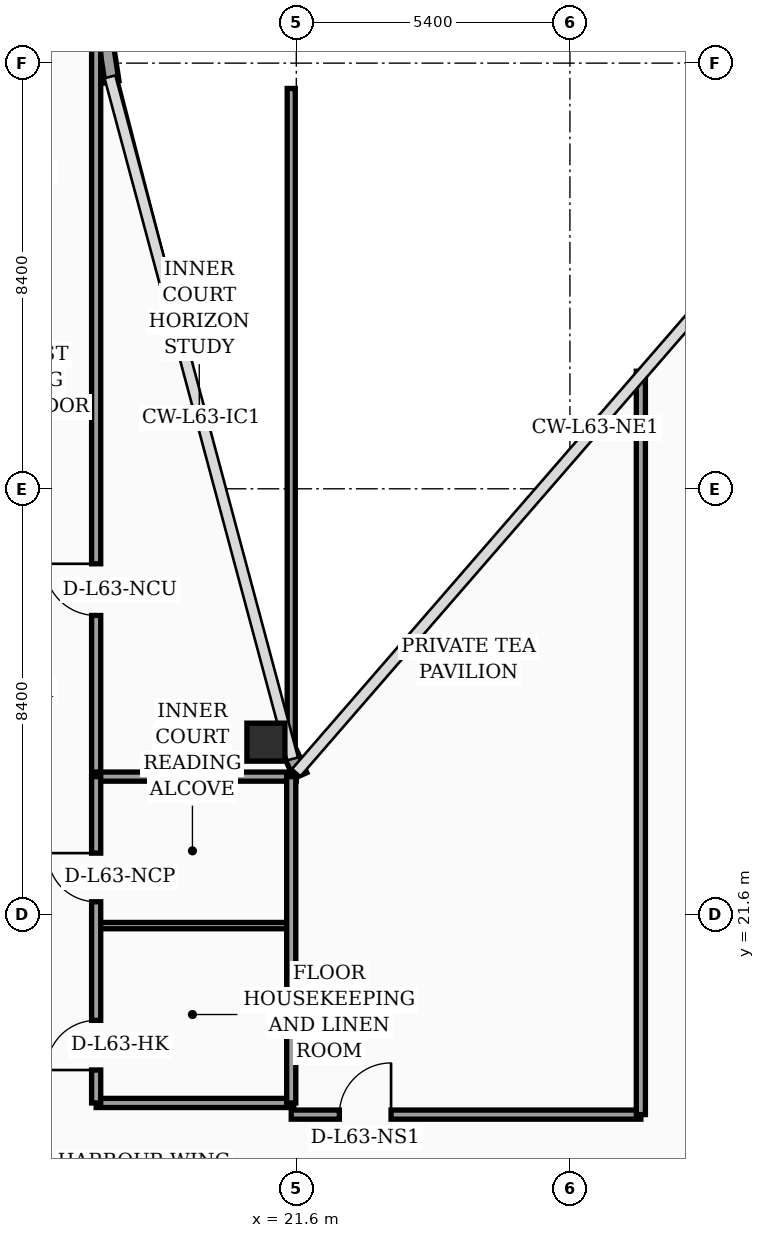
"""IFC4 building model, lengths in metres.
Left out: names, types, materials, properties, quantities, classifications, styles, units other than length and angle.
Written with IfcOpenShell. Run it as: python <this file> out.ifc"""

import sys

from ifc_helpers import new_model, si_unit, direction, frame, frame_2d, origin, origin_2d, place, context, subcontext, project, spatial, rectangle, hollow_rectangle, extrude, element, fill, save


model = new_model("IFC4")
c1 = context("Model", 3, precision=1e-05, world=origin(), true_north=direction((0.0, 1.0)))
c2 = subcontext(c1, "Body", "Model", "MODEL_VIEW")
j1 = project(units=[si_unit("LENGTHUNIT", "METRE"), si_unit("PLANEANGLEUNIT", "RADIAN")], contexts=[c1])
p1 = place(None, origin())
s1 = spatial("IfcSite", under=j1, at=p1, CompositionType="ELEMENT")
p2 = place(p1, origin())
s2 = spatial("IfcBuilding", under=s1, at=p2, CompositionType="ELEMENT")
p3 = place(p2, frame((0.0, 0.0, 255.2)))
s3 = spatial("IfcBuildingStorey", under=s2, at=p3, CompositionType="ELEMENT", Elevation=255.2)
p4 = place(p3, frame((21.0, 25.0, 0.0), z_axis=(0.0, 0.0, 1.0), x_axis=(1.0, 0.0, 0.0)))
e1 = element("IfcColumn", 1, at=p4, inside=s3, PredefinedType="COLUMN", context=c2, shape_type="SweptSolid", body=[
    extrude(hollow_rectangle(XDim=0.75, YDim=0.75, WallThickness=0.032, at=origin_2d()), origin(), (0.0, 0.0, 1.0), 3.56),
])
p5 = place(p3, frame((21.68, 24.34, 0.0), z_axis=(0.0, 0.0, 1.0), x_axis=(-0.40758134973, 0.913168901875, 0.0)))
e2 = element("IfcWall", 2, at=p5, inside=s3, PredefinedType="SOLIDWALL", context=c2, shape_type="SweptSolid", body=[
    extrude(rectangle(XDim=0.471, YDim=0.28, at=frame_2d((0.235, 0.0))), origin(), (0.0, 0.0, 1.0), 3.56),
])
p6 = place(p3, frame((17.962, 38.03, 0.0), z_axis=(0.0, 0.0, 1.0), x_axis=(-0.15141125477, 0.988470855377, 0.0)))
e3 = element("IfcWall", 3, at=p6, inside=s3, PredefinedType="SOLIDWALL", context=c2, shape_type="SweptSolid", body=[
    extrude(rectangle(XDim=0.739, YDim=0.28, at=frame_2d((0.369, 0.0))), origin(), (0.0, 0.0, 1.0), 3.56),
])
p7 = place(p3, frame((17.65, 24.3, 0.0), z_axis=(0.0, 0.0, 1.0), x_axis=(0.0, 1.0, 0.0)))
e4 = element("IfcWall", 4, at=p7, inside=s3, PredefinedType="PARTITIONING", context=c2, shape_type="SweptSolid", body=[
    extrude(rectangle(XDim=18.15, YDim=0.18, at=frame_2d((9.075, 0.0))), origin(), (0.0, 0.0, 1.0), 2.99),
])
p8 = place(p7, frame((3.2, 0.0, 0.0)))
e5 = element("IfcOpeningElement", 5, at=p8, cuts=e4, PredefinedType="OPENING", context=c2, shape_type="SweptSolid", body=[
    extrude(rectangle(XDim=1.02, YDim=2.2, at=frame_2d((0.51, 1.1))), frame((0.0, 0.1, 0.0), z_axis=(0.0, -1.0, 0.0), x_axis=(1.0, 0.0, 0.0)), (0.0, 0.0, 1.0), 0.2),
])
p9 = place(p3, frame((17.65, 17.88, 0.0), z_axis=(0.0, 0.0, 1.0), x_axis=(1.0, 0.0, 0.0)))
e6 = element("IfcWall", 6, at=p9, inside=s3, PredefinedType="PARTITIONING", context=c2, shape_type="SweptSolid", body=[
    extrude(rectangle(XDim=3.9, YDim=0.18, at=frame_2d((1.95, 0.0))), origin(), (0.0, 0.0, 1.0), 3.56),
])
p10 = place(p3, frame((17.65, 21.38, 0.0), z_axis=(0.0, 0.0, 1.0), x_axis=(1.0, 0.0, 0.0)))
e7 = element("IfcWall", 7, at=p10, inside=s3, PredefinedType="PARTITIONING", context=c2, shape_type="SweptSolid", body=[
    extrude(rectangle(XDim=3.9, YDim=0.125, at=frame_2d((1.95, 0.0))), origin(), (0.0, 0.0, 1.0), 3.09),
])
p11 = place(p3, frame((17.65, 24.32, 0.0), z_axis=(0.0, 0.0, 1.0), x_axis=(1.0, 0.0, 0.0)))
e8 = element("IfcWall", 8, at=p11, inside=s3, PredefinedType="PARTITIONING", context=c2, shape_type="SweptSolid", body=[
    extrude(rectangle(XDim=3.95, YDim=0.18, at=frame_2d((1.975, 0.0))), origin(), (0.0, 0.0, 1.0), 3.56),
])
p12 = place(p3, frame((21.5, 17.88, 0.0), z_axis=(0.0, 0.0, 1.0), x_axis=(0.0, 1.0, 0.0)))
e9 = element("IfcWall", 9, at=p12, inside=s3, PredefinedType="PARTITIONING", context=c2, shape_type="SweptSolid", body=[
    extrude(rectangle(XDim=6.44, YDim=0.18, at=frame_2d((3.22, 0.0))), origin(), (0.0, 0.0, 1.0), 3.09),
])
p13 = place(p3, frame((17.65, 17.88, 0.0), z_axis=(0.0, 0.0, 1.0), x_axis=(0.0, 1.0, 0.0)))
e10 = element("IfcWall", 10, at=p13, inside=s3, PredefinedType="PARTITIONING", context=c2, shape_type="SweptSolid", body=[
    extrude(rectangle(XDim=6.44, YDim=0.18, at=frame_2d((3.22, 0.0))), origin(), (0.0, 0.0, 1.0), 3.09),
])
p14 = place(p13, frame((0.65, 0.0, 0.0)))
e11 = element("IfcOpeningElement", 11, at=p14, cuts=e10, PredefinedType="OPENING", context=c2, shape_type="SweptSolid", body=[
    extrude(rectangle(XDim=0.98, YDim=2.15, at=frame_2d((0.49, 1.075))), frame((0.0, 0.1, 0.0), z_axis=(0.0, -1.0, 0.0), x_axis=(1.0, 0.0, 0.0)), (0.0, 0.0, 1.0), 0.2),
])
p15 = place(p13, frame((3.97, 0.0, 0.0)))
e12 = element("IfcOpeningElement", 12, at=p15, cuts=e10, PredefinedType="OPENING", context=c2, shape_type="SweptSolid", body=[
    extrude(rectangle(XDim=0.96, YDim=2.2, at=frame_2d((0.48, 1.1))), frame((0.0, 0.1, 0.0), z_axis=(0.0, -1.0, 0.0), x_axis=(1.0, 0.0, 0.0)), (0.0, 0.0, 1.0), 0.2),
])
p16 = place(p3, frame((21.5, 24.85, 0.0), z_axis=(0.0, 0.0, 1.0), x_axis=(0.0, 1.0, 0.0)))
e13 = element("IfcWall", 13, at=p16, inside=s3, PredefinedType="PARTITIONING", context=c2, shape_type="SweptSolid", body=[
    extrude(rectangle(XDim=13.05, YDim=0.16, at=frame_2d((6.525, 0.0))), origin(), (0.0, 0.0, 1.0), 2.99),
])
p17 = place(p3, frame((21.5, 17.65, 0.0), z_axis=(0.0, 0.0, 1.0), x_axis=(1.0, 0.0, 0.0)))
e14 = element("IfcWall", 14, at=p17, inside=s3, PredefinedType="PARTITIONING", context=c2, shape_type="SweptSolid", body=[
    extrude(rectangle(XDim=6.9, YDim=0.18, at=frame_2d((3.45, 0.0))), origin(), (0.0, 0.0, 1.0), 2.99),
])
p18 = place(p17, frame((0.95, 0.0, 0.0)))
e15 = element("IfcOpeningElement", 15, at=p18, cuts=e14, PredefinedType="OPENING", context=c2, shape_type="SweptSolid", body=[
    extrude(rectangle(XDim=1.02, YDim=2.2, at=frame_2d((0.51, 1.1))), frame((0.0, 0.1, 0.0), z_axis=(0.0, -1.0, 0.0), x_axis=(1.0, 0.0, 0.0)), (0.0, 0.0, 1.0), 0.2),
])
p19 = place(p3, frame((28.4, 17.65, 0.0), z_axis=(0.0, 0.0, 1.0), x_axis=(0.0, 1.0, 0.0)))
e16 = element("IfcWall", 16, at=p19, inside=s3, PredefinedType="PARTITIONING", context=c2, shape_type="SweptSolid", body=[
    extrude(rectangle(XDim=14.67, YDim=0.18, at=frame_2d((7.335, 0.0))), origin(), (0.0, 0.0, 1.0), 2.99),
])
p20 = place(p8, origin())
e17 = element("IfcDoor", 17, at=p20, inside=s3, OperationType="SINGLE_SWING_RIGHT", PredefinedType="DOOR", context=c2, shape_type="SweptSolid", body=[
    extrude(rectangle(XDim=1.02, YDim=2.2, at=frame_2d((0.51, 1.1))), frame((0.0, 0.025, 0.0), z_axis=(0.0, -1.0, 0.0), x_axis=(1.0, 0.0, 0.0)), (0.0, 0.0, 1.0), 0.05),
])
fill(e5, e17)
p21 = place(p14, origin())
e18 = element("IfcDoor", 18, at=p21, inside=s3, OperationType="SINGLE_SWING_LEFT", PredefinedType="DOOR", context=c2, shape_type="SweptSolid", body=[
    extrude(rectangle(XDim=0.98, YDim=2.15, at=frame_2d((0.49, 1.075))), frame((0.0, 0.025, 0.0), z_axis=(0.0, -1.0, 0.0), x_axis=(1.0, 0.0, 0.0)), (0.0, 0.0, 1.0), 0.05),
])
fill(e11, e18)
p22 = place(p15, origin())
e19 = element("IfcDoor", 19, at=p22, inside=s3, OperationType="SINGLE_SWING_RIGHT", PredefinedType="DOOR", context=c2, shape_type="SweptSolid", body=[
    extrude(rectangle(XDim=0.96, YDim=2.2, at=frame_2d((0.48, 1.1))), frame((0.0, 0.025, 0.0), z_axis=(0.0, -1.0, 0.0), x_axis=(1.0, 0.0, 0.0)), (0.0, 0.0, 1.0), 0.05),
])
fill(e12, e19)
p23 = place(p18, origin())
e20 = element("IfcDoor", 20, at=p23, inside=s3, OperationType="SINGLE_SWING_RIGHT", PredefinedType="DOOR", context=c2, shape_type="SweptSolid", body=[
    extrude(rectangle(XDim=1.02, YDim=2.2, at=frame_2d((0.51, 1.1))), frame((0.0, 0.025, 0.0), z_axis=(0.0, -1.0, 0.0), x_axis=(1.0, 0.0, 0.0)), (0.0, 0.0, 1.0), 0.05),
])
fill(e15, e20)
save(model, sys.argv[1])
